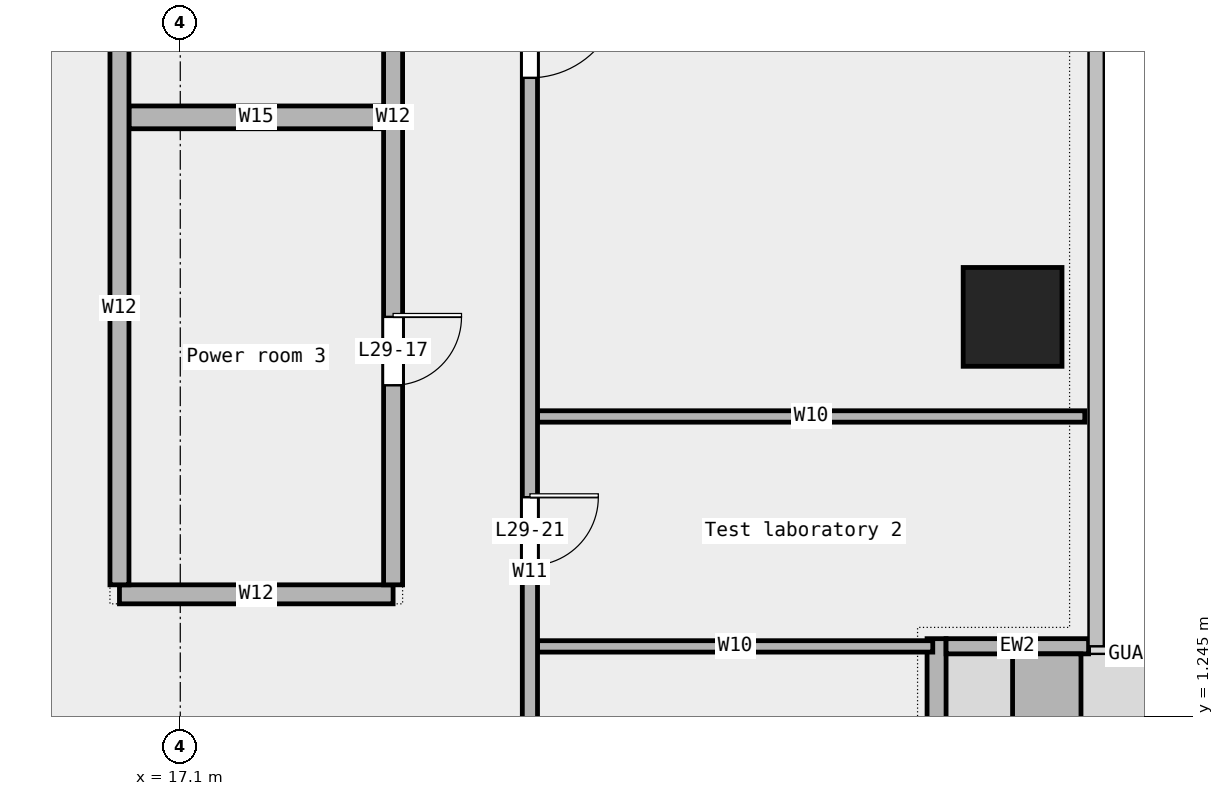
"""IFC4 building model, lengths in metres.
Left out: names, types, materials, properties, quantities, classifications, styles, units other than length and angle.
Written with IfcOpenShell. Run it as: python <this file> out.ifc"""

import sys

from ifc_helpers import new_model, si_unit, direction, frame, frame_2d, origin, origin_2d, place, context, subcontext, project, spatial, rectangle, extrude, element, fill, save


model = new_model("IFC4")
c1 = context("Model", 3, precision=1e-05, world=origin(), true_north=direction((0.0, 1.0)))
c2 = subcontext(c1, "Body", "Model", "MODEL_VIEW")
j1 = project(units=[si_unit("LENGTHUNIT", "METRE"), si_unit("PLANEANGLEUNIT", "RADIAN")], contexts=[c1])
p1 = place(None, origin())
s1 = spatial("IfcSite", under=j1, at=p1, CompositionType="ELEMENT")
p2 = place(p1, origin())
s2 = spatial("IfcBuilding", under=s1, at=p2, CompositionType="ELEMENT")
p3 = place(p2, frame((0.0, 0.0, 144.1)))
s3 = spatial("IfcBuildingStorey", under=s2, at=p3, CompositionType="ELEMENT", Elevation=144.1)
p4 = place(p3, frame((28.05, 6.5, 0.0), z_axis=(0.0, 0.0, 1.0), x_axis=(1.0, 0.0, 0.0)))
e1 = element("IfcColumn", 1, at=p4, inside=s3, PredefinedType="COLUMN", context=c2, shape_type="SweptSolid", body=[
    extrude(rectangle(XDim=1.3, YDim=1.3, at=origin_2d()), origin(), (0.0, 0.0, 1.0), 3.9),
])
p5 = place(p3, frame((27.05, -10.933, 0.0), z_axis=(0.0, 0.0, 1.0), x_axis=(0.0, 1.0, 0.0)))
e2 = element("IfcWall", 2, at=p5, inside=s3, PredefinedType="STANDARD", context=c2, shape_type="SweptSolid", body=[
    extrude(rectangle(XDim=13.2, YDim=0.25, at=frame_2d((6.6, 0.0))), origin(), (0.0, 0.0, 1.0), 3.9),
])
p6 = place(p5, frame((1.5, 0.0, 0.45)))
e3 = element("IfcOpeningElement", 3, at=p6, cuts=e2, PredefinedType="OPENING", context=c2, shape_type="SweptSolid", body=[
    extrude(rectangle(XDim=1.5, YDim=2.4, at=frame_2d((0.75, 1.2))), frame((0.0, 0.137, 0.0), z_axis=(0.0, -1.0, 0.0), x_axis=(1.0, 0.0, 0.0)), (0.0, 0.0, 1.0), 0.274),
])
p7 = place(p5, frame((5.75, 0.0, 0.0)))
e4 = element("IfcOpeningElement", 4, at=p7, cuts=e2, PredefinedType="OPENING", context=c2, shape_type="SweptSolid", body=[
    extrude(rectangle(XDim=1.8, YDim=2.4, at=frame_2d((0.9, 1.2))), frame((0.0, 0.137, 0.0), z_axis=(0.0, -1.0, 0.0), x_axis=(1.0, 0.0, 0.0)), (0.0, 0.0, 1.0), 0.274),
])
p8 = place(p5, frame((10.25, 0.0, 0.45)))
e5 = element("IfcOpeningElement", 5, at=p8, cuts=e2, PredefinedType="OPENING", context=c2, shape_type="SweptSolid", body=[
    extrude(rectangle(XDim=1.5, YDim=2.4, at=frame_2d((0.75, 1.2))), frame((0.0, 0.137, 0.0), z_axis=(0.0, -1.0, 0.0), x_axis=(1.0, 0.0, 0.0)), (0.0, 0.0, 1.0), 0.274),
])
p9 = place(p3, frame((29.05, 2.167, 0.0), z_axis=(0.0, 0.0, 1.0), x_axis=(-1.0, 0.0, 0.0)))
e6 = element("IfcWall", 6, at=p9, inside=s3, PredefinedType="STANDARD", context=c2, shape_type="SweptSolid", body=[
    extrude(rectangle(XDim=1.875, YDim=0.2, at=frame_2d((0.938, 0.0))), origin(), (0.0, 0.0, 1.0), 3.9),
])
p10 = place(p3, frame((28.5, -1.533, 0.0), z_axis=(0.0, 0.0, 1.0), x_axis=(0.0, 1.0, 0.0)))
e7 = element("IfcWall", 7, at=p10, inside=s3, PredefinedType="STANDARD", context=c2, shape_type="SweptSolid", body=[
    extrude(rectangle(XDim=3.6, YDim=0.9, at=frame_2d((1.8, 0.0))), origin(), (0.0, 0.0, 1.0), 0.7),
])
p11 = place(p3, frame((21.8, 2.165, 0.0), z_axis=(0.0, 0.0, 1.0), x_axis=(1.0, 0.0, 0.0)))
e8 = element("IfcWall", 8, at=p11, inside=s3, PredefinedType="PARTITIONING", context=c2, shape_type="SweptSolid", body=[
    extrude(rectangle(XDim=5.2, YDim=0.15, at=frame_2d((2.6, 0.0))), origin(), (0.0, 0.0, 1.0), 3.9),
])
p12 = place(p3, frame((16.3, 2.85, 0.0), z_axis=(0.0, 0.0, 1.0), x_axis=(1.0, 0.0, 0.0)))
e9 = element("IfcWall", 9, at=p12, inside=s3, PredefinedType="PARTITIONING", context=c2, shape_type="SweptSolid", body=[
    extrude(rectangle(XDim=3.6, YDim=0.25, at=frame_2d((1.8, 0.0))), origin(), (0.0, 0.0, 1.0), 3.9),
])
p13 = place(p3, frame((21.8, 5.19, 0.0), z_axis=(0.0, 0.0, 1.0), x_axis=(1.0, 0.0, 0.0)))
e10 = element("IfcWall", 10, at=p13, inside=s3, PredefinedType="PARTITIONING", context=c2, shape_type="SweptSolid", body=[
    extrude(rectangle(XDim=7.2, YDim=0.15, at=frame_2d((3.6, 0.0))), origin(), (0.0, 0.0, 1.0), 3.9),
])
p14 = place(p3, frame((16.425, 9.125, 0.0), z_axis=(0.0, 0.0, 1.0), x_axis=(1.0, 0.0, 0.0)))
e11 = element("IfcWall", 11, at=p14, inside=s3, PredefinedType="PARTITIONING", context=c2, shape_type="SweptSolid", body=[
    extrude(rectangle(XDim=3.35, YDim=0.3, at=frame_2d((1.675, 0.0))), origin(), (0.0, 0.0, 1.0), 3.9),
])
p15 = place(p3, frame((16.3, 2.975, 0.0), z_axis=(0.0, 0.0, 1.0), x_axis=(0.0, 1.0, 0.0)))
e12 = element("IfcWall", 12, at=p15, inside=s3, PredefinedType="PARTITIONING", context=c2, shape_type="SweptSolid", body=[
    extrude(rectangle(XDim=7.275, YDim=0.25, at=frame_2d((3.637, 0.0))), origin(), (0.0, 0.0, 1.0), 3.9),
])
p16 = place(p3, frame((19.9, 2.975, 0.0), z_axis=(0.0, 0.0, 1.0), x_axis=(0.0, 1.0, 0.0)))
e13 = element("IfcWall", 13, at=p16, inside=s3, PredefinedType="PARTITIONING", context=c2, shape_type="SweptSolid", body=[
    extrude(rectangle(XDim=12.3, YDim=0.25, at=frame_2d((6.15, 0.0))), origin(), (0.0, 0.0, 1.0), 3.9),
])
p17 = place(p16, frame((8.775, 0.0, 0.0)))
e14 = element("IfcOpeningElement", 14, at=p17, cuts=e13, PredefinedType="OPENING", context=c2, shape_type="SweptSolid", body=[
    extrude(rectangle(XDim=0.9, YDim=2.1, at=frame_2d((0.45, 1.05))), frame((0.0, 0.137, 0.0), z_axis=(0.0, -1.0, 0.0), x_axis=(1.0, 0.0, 0.0)), (0.0, 0.0, 1.0), 0.274),
])
p18 = place(p16, frame((2.625, 0.0, 0.0)))
e15 = element("IfcOpeningElement", 15, at=p18, cuts=e13, PredefinedType="OPENING", context=c2, shape_type="SweptSolid", body=[
    extrude(rectangle(XDim=0.9, YDim=2.1, at=frame_2d((0.45, 1.05))), frame((0.0, 0.137, 0.0), z_axis=(0.0, -1.0, 0.0), x_axis=(1.0, 0.0, 0.0)), (0.0, 0.0, 1.0), 0.274),
])
p19 = place(p3, frame((21.7, -9.0, 0.0), z_axis=(0.0, 0.0, 1.0), x_axis=(0.0, 1.0, 0.0)))
e16 = element("IfcWall", 16, at=p19, inside=s3, PredefinedType="PARTITIONING", context=c2, shape_type="SweptSolid", body=[
    extrude(rectangle(XDim=24.3, YDim=0.2, at=frame_2d((12.15, 0.0))), origin(), (0.0, 0.0, 1.0), 3.9),
])
p20 = place(p19, frame((18.645, 0.0, 0.0)))
e17 = element("IfcOpeningElement", 17, at=p20, cuts=e16, PredefinedType="OPENING", context=c2, shape_type="SweptSolid", body=[
    extrude(rectangle(XDim=1.2, YDim=2.1, at=frame_2d((0.6, 1.05))), frame((0.0, 0.112, 0.0), z_axis=(0.0, -1.0, 0.0), x_axis=(1.0, 0.0, 0.0)), (0.0, 0.0, 1.0), 0.224),
])
p21 = place(p19, frame((4.833, 0.0, 0.0)))
e18 = element("IfcOpeningElement", 18, at=p21, cuts=e16, PredefinedType="OPENING", context=c2, shape_type="SweptSolid", body=[
    extrude(rectangle(XDim=1.5, YDim=2.1, at=frame_2d((0.75, 1.05))), frame((0.0, 0.112, 0.0), z_axis=(0.0, -1.0, 0.0), x_axis=(1.0, 0.0, 0.0)), (0.0, 0.0, 1.0), 0.224),
])
p22 = place(p19, frame((12.228, 0.0, 0.0)))
e19 = element("IfcOpeningElement", 19, at=p22, cuts=e16, PredefinedType="OPENING", context=c2, shape_type="SweptSolid", body=[
    extrude(rectangle(XDim=0.9, YDim=2.1, at=frame_2d((0.45, 1.05))), frame((0.0, 0.112, 0.0), z_axis=(0.0, -1.0, 0.0), x_axis=(1.0, 0.0, 0.0)), (0.0, 0.0, 1.0), 0.224),
])
p23 = place(p20, origin())
e20 = element("IfcDoor", 20, at=p23, inside=s3, OperationType="SINGLE_SWING_LEFT", PredefinedType="DOOR", context=c2, shape_type="SweptSolid", body=[
    extrude(rectangle(XDim=1.2, YDim=2.1, at=frame_2d((0.6, 1.05))), frame((0.0, 0.025, 0.0), z_axis=(0.0, -1.0, 0.0), x_axis=(1.0, 0.0, 0.0)), (0.0, 0.0, 1.0), 0.05),
])
fill(e17, e20)
p24 = place(p18, origin())
e21 = element("IfcDoor", 21, at=p24, inside=s3, OperationType="SINGLE_SWING_LEFT", PredefinedType="DOOR", context=c2, shape_type="SweptSolid", body=[
    extrude(rectangle(XDim=0.9, YDim=2.1, at=frame_2d((0.45, 1.05))), frame((0.0, 0.025, 0.0), z_axis=(0.0, -1.0, 0.0), x_axis=(1.0, 0.0, 0.0)), (0.0, 0.0, 1.0), 0.05),
])
fill(e15, e21)
p25 = place(p22, origin())
e22 = element("IfcDoor", 22, at=p25, inside=s3, OperationType="SINGLE_SWING_LEFT", PredefinedType="DOOR", context=c2, shape_type="SweptSolid", body=[
    extrude(rectangle(XDim=0.9, YDim=2.1, at=frame_2d((0.45, 1.05))), frame((0.0, 0.025, 0.0), z_axis=(0.0, -1.0, 0.0), x_axis=(1.0, 0.0, 0.0)), (0.0, 0.0, 1.0), 0.05),
])
fill(e19, e22)
save(model, sys.argv[1])
